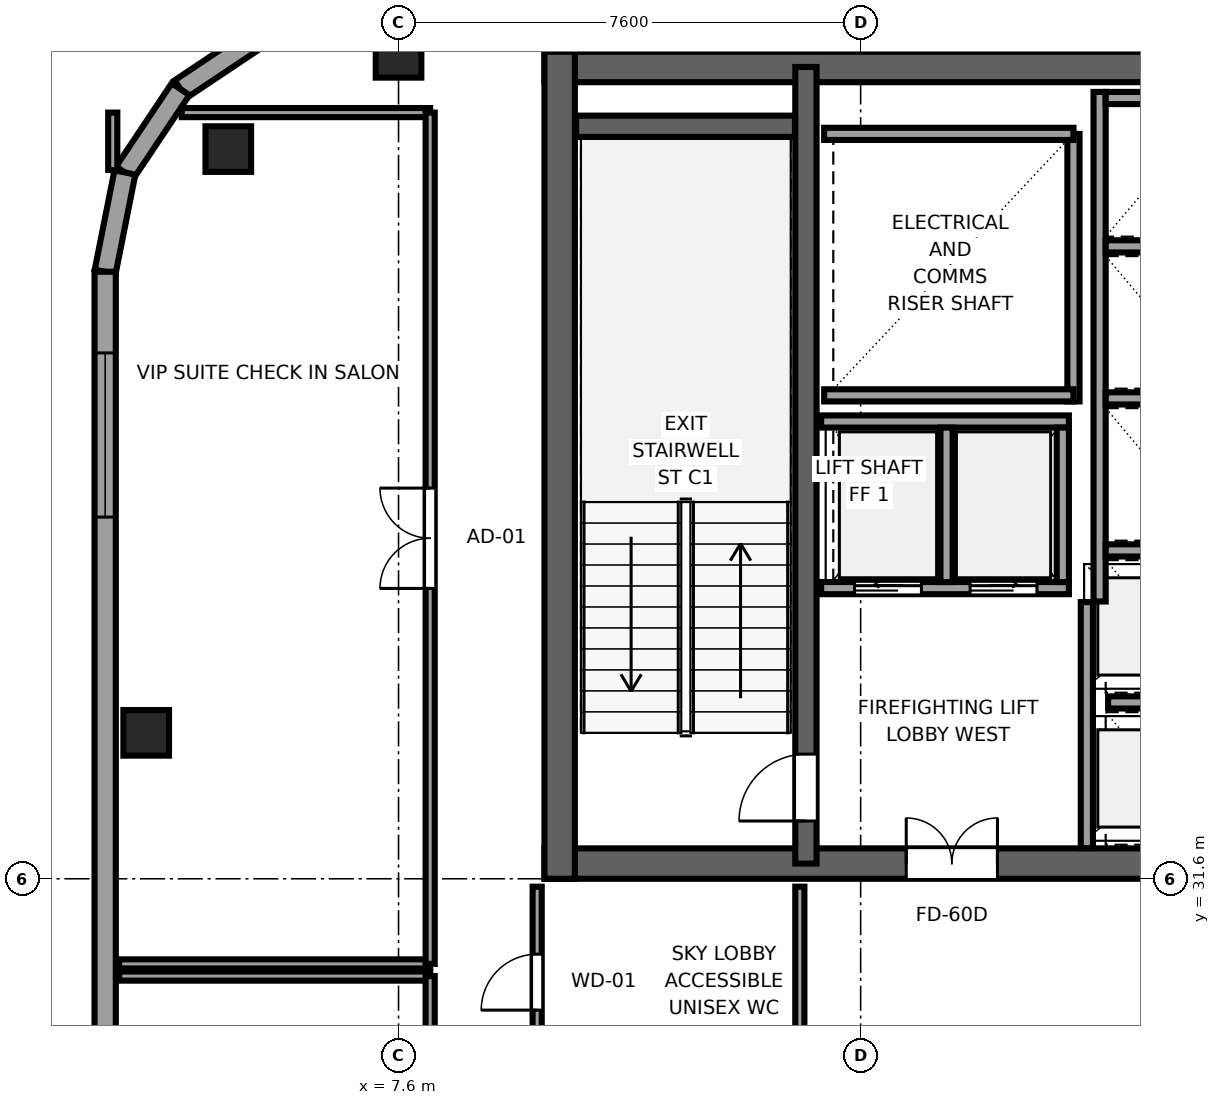
"""IFC4 building model, lengths in metres.
Left out: names, types, materials, properties, quantities, classifications, styles, units other than length and angle.
Written with IfcOpenShell. Run it as: python <this file> out.ifc"""

import sys

from ifc_helpers import new_model, si_unit, direction, frame, frame_2d, origin, origin_2d, place, context, subcontext, project, spatial, rectangle, extrude, source, transform, mapped, element, fill, save


model = new_model("IFC4")
c1 = context("Model", 3, precision=1e-05, world=origin(), true_north=direction((0.0, 1.0)))
c2 = subcontext(c1, "Body", "Model", "MODEL_VIEW")
j1 = project(units=[si_unit("LENGTHUNIT", "METRE"), si_unit("PLANEANGLEUNIT", "RADIAN")], contexts=[c1])
p1 = place(None, origin())
s1 = spatial("IfcSite", under=j1, at=p1, CompositionType="ELEMENT")
p2 = place(p1, origin())
s2 = spatial("IfcBuilding", under=s1, at=p2, CompositionType="ELEMENT")
p3 = place(p2, frame((0.0, 0.0, 205.3)))
s3 = spatial("IfcBuildingStorey", under=s2, at=p3, CompositionType="ELEMENT", Elevation=205.3)
p4 = place(p3, frame((10.0, 31.85, 0.0), z_axis=(0.0, 0.0, 1.0), x_axis=(1.0, 0.0, 0.0)))
e1 = element("IfcWall", 1, at=p4, inside=s3, PredefinedType="SHEAR", context=c2, shape_type="SweptSolid", body=[
    extrude(rectangle(XDim=26.0, YDim=0.5, at=frame_2d((13.0, 0.0))), origin(), (0.0, 0.0, 1.0), 4.4),
])
p5 = place(p4, frame((7.45, 0.0, 0.0), z_axis=(0.0, 0.0, 1.0), x_axis=(-1.0, 0.0, 0.0)))
e2 = element("IfcOpeningElement", 2, at=p5, cuts=e1, PredefinedType="OPENING", context=c2, shape_type="SweptSolid", body=[
    extrude(rectangle(XDim=1.5, YDim=2.04, at=frame_2d((0.75, 1.02))), frame((0.0, 0.26, 0.0), z_axis=(0.0, -1.0, 0.0), x_axis=(1.0, 0.0, 0.0)), (0.0, 0.0, 1.0), 0.52),
])
p6 = place(p4, frame((13.75, 0.0, 0.0), z_axis=(0.0, 0.0, 1.0), x_axis=(-1.0, 0.0, 0.0)))
e3 = element("IfcOpeningElement", 3, at=p6, cuts=e1, PredefinedType="OPENING", context=c2, shape_type="SweptSolid", body=[
    extrude(rectangle(XDim=1.5, YDim=2.04, at=frame_2d((0.75, 1.02))), frame((0.0, 0.26, 0.0), z_axis=(0.0, -1.0, 0.0), x_axis=(1.0, 0.0, 0.0)), (0.0, 0.0, 1.0), 0.52),
])
p7 = place(p4, frame((20.05, 0.0, 0.0), z_axis=(0.0, 0.0, 1.0), x_axis=(-1.0, 0.0, 0.0)))
e4 = element("IfcOpeningElement", 4, at=p7, cuts=e1, PredefinedType="OPENING", context=c2, shape_type="SweptSolid", body=[
    extrude(rectangle(XDim=1.5, YDim=2.04, at=frame_2d((0.75, 1.02))), frame((0.0, 0.26, 0.0), z_axis=(0.0, -1.0, 0.0), x_axis=(1.0, 0.0, 0.0)), (0.0, 0.0, 1.0), 0.52),
])
p8 = place(p3, frame((10.0, 44.95, 0.0), z_axis=(0.0, 0.0, 1.0), x_axis=(1.0, 0.0, 0.0)))
e5 = element("IfcWall", 5, at=p8, inside=s3, PredefinedType="SHEAR", context=c2, shape_type="SweptSolid", body=[
    extrude(rectangle(XDim=26.0, YDim=0.5, at=frame_2d((13.0, 0.0))), origin(), (0.0, 0.0, 1.0), 4.4),
])
p9 = place(p3, frame((10.25, 31.6, 0.0), z_axis=(0.0, 0.0, 1.0), x_axis=(0.0, 1.0, 0.0)))
e6 = element("IfcWall", 6, at=p9, inside=s3, PredefinedType="SHEAR", context=c2, shape_type="SweptSolid", body=[
    extrude(rectangle(XDim=13.6, YDim=0.5, at=frame_2d((6.8, 0.0))), origin(), (0.0, 0.0, 1.0), 4.4),
])
p10 = place(p3, frame((14.3, 31.85, 0.0), z_axis=(0.0, 0.0, 1.0), x_axis=(0.0, 1.0, 0.0)))
e7 = element("IfcWall", 7, at=p10, inside=s3, PredefinedType="SHEAR", context=c2, shape_type="SweptSolid", body=[
    extrude(rectangle(XDim=13.1, YDim=0.35, at=frame_2d((6.55, 0.0))), origin(), (0.0, 0.0, 1.0), 4.4),
])
p11 = place(p10, frame((0.7, 0.0, 0.0)))
e8 = element("IfcOpeningElement", 8, at=p11, cuts=e7, PredefinedType="OPENING", context=c2, shape_type="SweptSolid", body=[
    extrude(rectangle(XDim=1.1, YDim=2.12, at=frame_2d((0.55, 1.06))), frame((0.0, 0.185, 0.0), z_axis=(0.0, -1.0, 0.0), x_axis=(1.0, 0.0, 0.0)), (0.0, 0.0, 1.0), 0.37),
])
p12 = place(p3, frame((10.52, 43.975, 0.0), z_axis=(0.0, 0.0, 1.0), x_axis=(1.0, 0.0, 0.0)))
e9 = element("IfcWall", 9, at=p12, inside=s3, PredefinedType="SHEAR", context=c2, shape_type="SweptSolid", body=[
    extrude(rectangle(XDim=3.6, YDim=0.35, at=frame_2d((1.8, 0.0))), origin(), (0.0, 0.0, 1.0), 4.4),
])
m1 = source(origin(), c2, "Body", "SweptSolid", [
    extrude(rectangle(XDim=0.75, YDim=0.75, at=origin_2d()), origin(), (0.0, 0.0, 1.0), 4.4),
])
for number, where, z_axis, x_axis in (
    (10, (4.8, 43.6, 0.0), (0.0, 0.0, 1.0), (1.0, 0.0, 0.0)),
    (11, (7.6, 45.15, 0.0), (0.0, 0.0, 1.0), (1.0, 0.0, 0.0)),
    (12, (3.45, 34.0, 0.0), (0.0, 0.0, 1.0), (1.0, 0.0, 0.0)),
):
    element("IfcColumn", number, at=place(p3, frame(where, z_axis=z_axis, x_axis=x_axis)), inside=s3, PredefinedType="COLUMN", context=c2, shape_type="MappedRepresentation", body=[
        mapped(m1, transform((0.0, 0.0, 0.0), x_axis=(1.0, 0.0, 0.0), y_axis=(0.0, 1.0, 0.0), z_axis=(0.0, 0.0, 1.0), scale=1.0)),
    ])
for number, where, z_axis, x_axis in (
    (13, (5.385, 45.5, 0.0), (0.0, 0.0, 1.0), (-0.832, -0.556, 0.0)),
    (14, (4.015, 44.585, 0.0), (0.0, 0.0, 1.0), (-0.556, -0.831, 0.0)),
):
    element("IfcWall", number, at=place(p3, frame(where, z_axis=z_axis, x_axis=x_axis)), inside=s3, PredefinedType="SOLIDWALL", context=c2, shape_type="SweptSolid", body=[
        extrude(rectangle(XDim=1.647, YDim=0.35, at=frame_2d((0.824, 0.0))), origin(), (0.0, 0.0, 1.0), 3.75),
    ])
p13 = place(p3, frame((3.1, 43.216, 0.0), z_axis=(0.0, 0.0, 1.0), x_axis=(-0.195044345786, -0.980794424524, 0.0)))
e15 = element("IfcWall", 15, at=p13, inside=s3, PredefinedType="SOLIDWALL", context=c2, shape_type="SweptSolid", body=[
    extrude(rectangle(XDim=1.665, YDim=0.35, at=frame_2d((0.833, 0.0))), origin(), (0.0, 0.0, 1.0), 4.22),
])
p14 = place(p3, frame((2.775, 41.583, 0.0), z_axis=(0.0, 0.0, 1.0), x_axis=(0.0, -1.0, 0.0)))
e16 = element("IfcWall", 16, at=p14, inside=s3, PredefinedType="SOLIDWALL", context=c2, shape_type="SweptSolid", body=[
    extrude(rectangle(XDim=34.566, YDim=0.35, at=frame_2d((17.283, 0.0))), origin(), (0.0, 0.0, 1.0), 4.22),
])
p15 = place(p14, frame((1.335, 0.0, 0.68)))
e17 = element("IfcOpeningElement", 17, at=p15, cuts=e16, PredefinedType="OPENING", context=c2, shape_type="SweptSolid", body=[
    extrude(rectangle(XDim=2.7, YDim=1.95, at=frame_2d((1.35, 0.975))), frame((0.0, 0.185, 0.0), z_axis=(0.0, -1.0, 0.0), x_axis=(1.0, 0.0, 0.0)), (0.0, 0.0, 1.0), 0.37),
])
p16 = place(p14, frame((13.297, 0.0, 0.68)))
e18 = element("IfcOpeningElement", 18, at=p16, cuts=e16, PredefinedType="OPENING", context=c2, shape_type="SweptSolid", body=[
    extrude(rectangle(XDim=2.7, YDim=1.95, at=frame_2d((1.35, 0.975))), frame((0.0, 0.185, 0.0), z_axis=(0.0, -1.0, 0.0), x_axis=(1.0, 0.0, 0.0)), (0.0, 0.0, 1.0), 0.37),
])
p17 = place(p14, frame((22.189, 0.0, 0.68)))
e19 = element("IfcOpeningElement", 19, at=p17, cuts=e16, PredefinedType="OPENING", context=c2, shape_type="SweptSolid", body=[
    extrude(rectangle(XDim=2.7, YDim=1.95, at=frame_2d((1.35, 0.975))), frame((0.0, 0.185, 0.0), z_axis=(0.0, -1.0, 0.0), x_axis=(1.0, 0.0, 0.0)), (0.0, 0.0, 1.0), 0.37),
])
p18 = place(p14, frame((26.36, 0.0, 0.68)))
e20 = element("IfcOpeningElement", 20, at=p18, cuts=e16, PredefinedType="OPENING", context=c2, shape_type="SweptSolid", body=[
    extrude(rectangle(XDim=2.7, YDim=1.95, at=frame_2d((1.35, 0.975))), frame((0.0, 0.185, 0.0), z_axis=(0.0, -1.0, 0.0), x_axis=(1.0, 0.0, 0.0)), (0.0, 0.0, 1.0), 0.37),
])
p19 = place(p14, frame((29.98, 0.0, 0.68)))
e21 = element("IfcOpeningElement", 21, at=p19, cuts=e16, PredefinedType="OPENING", context=c2, shape_type="SweptSolid", body=[
    extrude(rectangle(XDim=2.7, YDim=1.95, at=frame_2d((1.35, 0.975))), frame((0.0, 0.185, 0.0), z_axis=(0.0, -1.0, 0.0), x_axis=(1.0, 0.0, 0.0)), (0.0, 0.0, 1.0), 0.37),
])
p20 = place(p3, frame((18.7, 39.45, 0.0), z_axis=(0.0, 0.0, 1.0), x_axis=(0.0, 1.0, 0.0)))
e22 = element("IfcWall", 22, at=p20, inside=s3, PredefinedType="SOLIDWALL", context=c2, shape_type="SweptSolid", body=[
    extrude(rectangle(XDim=4.4, YDim=0.2, at=frame_2d((2.2, 0.0))), origin(), (0.0, 0.0, 1.0), 4.22),
])
for number, where, z_axis, x_axis in (
    (23, (14.6, 39.55, 0.0), (0.0, 0.0, 1.0), (1.0, 0.0, 0.0)),
    (24, (14.6, 43.85, 0.0), (0.0, 0.0, 1.0), (1.0, 0.0, 0.0)),
):
    element("IfcWall", number, at=place(p3, frame(where, z_axis=z_axis, x_axis=x_axis)), inside=s3, PredefinedType="SOLIDWALL", context=c2, shape_type="SweptSolid", body=[
        extrude(rectangle(XDim=4.1, YDim=0.2, at=frame_2d((2.05, 0.0))), origin(), (0.0, 0.0, 1.0), 4.22),
    ])
p21 = place(p3, frame((18.92, 32.104, 0.0), z_axis=(0.0, 0.0, 1.0), x_axis=(0.0, 1.0, 0.0)))
e25 = element("IfcWall", 25, at=p21, inside=s3, PredefinedType="SOLIDWALL", context=c2, shape_type="SweptSolid", body=[
    extrude(rectangle(XDim=4.046, YDim=0.2, at=frame_2d((2.023, 0.0))), origin(), (0.0, 0.0, 1.0), 4.22),
])
p22 = place(p3, frame((19.13, 36.16, 0.0), z_axis=(0.0, 0.0, 1.0), x_axis=(0.0, 1.0, 0.0)))
e26 = element("IfcWall", 26, at=p22, inside=s3, PredefinedType="SOLIDWALL", context=c2, shape_type="SweptSolid", body=[
    extrude(rectangle(XDim=8.38, YDim=0.2, at=frame_2d((4.19, 0.0))), origin(), (0.0, 0.0, 1.0), 4.22),
])
p23 = place(p3, frame((19.23, 44.44, 0.0), z_axis=(0.0, 0.0, 1.0), x_axis=(1.0, 0.0, 0.0)))
e27 = element("IfcWall", 27, at=p23, inside=s3, PredefinedType="SOLIDWALL", context=c2, shape_type="SweptSolid", body=[
    extrude(rectangle(XDim=1.84, YDim=0.2, at=frame_2d((0.92, 0.0))), origin(), (0.0, 0.0, 1.0), 4.22),
])
p24 = place(p3, frame((19.27, 34.5, 0.0), z_axis=(0.0, 0.0, 1.0), x_axis=(1.0, 0.0, 0.0)))
e28 = element("IfcWall", 28, at=p24, inside=s3, PredefinedType="SOLIDWALL", context=c2, shape_type="SweptSolid", body=[
    extrude(rectangle(XDim=1.8, YDim=0.2, at=frame_2d((0.9, 0.0))), origin(), (0.0, 0.0, 1.0), 4.22),
])
for number, where, z_axis, x_axis in (
    (29, (19.23, 37.0, 0.0), (0.0, 0.0, 1.0), (1.0, 0.0, 0.0)),
    (30, (19.23, 39.5, 0.0), (0.0, 0.0, 1.0), (1.0, 0.0, 0.0)),
    (31, (19.23, 42.0, 0.0), (0.0, 0.0, 1.0), (1.0, 0.0, 0.0)),
):
    element("IfcWall", number, at=place(p3, frame(where, z_axis=z_axis, x_axis=x_axis)), inside=s3, PredefinedType="SOLIDWALL", context=c2, shape_type="SweptSolid", body=[
        extrude(rectangle(XDim=1.84, YDim=0.2, at=frame_2d((0.92, 0.0))), origin(), (0.0, 0.0, 1.0), 4.22),
    ])
p25 = place(p3, frame((14.55, 36.38, 0.0), z_axis=(0.0, 0.0, 1.0), x_axis=(1.0, 0.0, 0.0)))
e32 = element("IfcWall", 32, at=p25, inside=s3, PredefinedType="SOLIDWALL", context=c2, shape_type="SweptSolid", body=[
    extrude(rectangle(XDim=4.075, YDim=0.2, at=frame_2d((2.038, 0.0))), origin(), (0.0, 0.0, 1.0), 4.22),
])
p26 = place(p25, frame((0.55, 0.0, 0.0)))
e33 = element("IfcOpeningElement", 33, at=p26, cuts=e32, PredefinedType="OPENING", context=c2, shape_type="SweptSolid", body=[
    extrude(rectangle(XDim=1.1, YDim=2.12, at=frame_2d((0.55, 1.06))), frame((0.0, 0.11, 0.0), z_axis=(0.0, -1.0, 0.0), x_axis=(1.0, 0.0, 0.0)), (0.0, 0.0, 1.0), 0.22),
])
p27 = place(p25, frame((2.45, 0.0, 0.0)))
e34 = element("IfcOpeningElement", 34, at=p27, cuts=e32, PredefinedType="OPENING", context=c2, shape_type="SweptSolid", body=[
    extrude(rectangle(XDim=1.1, YDim=2.12, at=frame_2d((0.55, 1.06))), frame((0.0, 0.11, 0.0), z_axis=(0.0, -1.0, 0.0), x_axis=(1.0, 0.0, 0.0)), (0.0, 0.0, 1.0), 0.22),
])
p28 = place(p3, frame((14.55, 39.12, 0.0), z_axis=(0.0, 0.0, 1.0), x_axis=(1.0, 0.0, 0.0)))
e35 = element("IfcWall", 35, at=p28, inside=s3, PredefinedType="SOLIDWALL", context=c2, shape_type="SweptSolid", body=[
    extrude(rectangle(XDim=4.075, YDim=0.2, at=frame_2d((2.038, 0.0))), origin(), (0.0, 0.0, 1.0), 4.22),
])
for number, where, z_axis, x_axis in (
    (36, (18.525, 36.48, 0.0), (0.0, 0.0, 1.0), (0.0, 1.0, 0.0)),
    (37, (16.613, 36.48, 0.0), (0.0, 0.0, 1.0), (0.0, 1.0, 0.0)),
):
    element("IfcWall", number, at=place(p3, frame(where, z_axis=z_axis, x_axis=x_axis)), inside=s3, PredefinedType="SOLIDWALL", context=c2, shape_type="SweptSolid", body=[
        extrude(rectangle(XDim=2.54, YDim=0.2, at=frame_2d((1.27, 0.0))), origin(), (0.0, 0.0, 1.0), 4.22),
    ])
p29 = place(p3, frame((3.005, 30.2, 0.0), z_axis=(0.0, 0.0, 1.0), x_axis=(1.0, 0.0, 0.0)))
e38 = element("IfcWall", 38, at=p29, inside=s3, PredefinedType="PARTITIONING", context=c2, shape_type="SweptSolid", body=[
    extrude(rectangle(XDim=5.115, YDim=0.15, at=frame_2d((2.558, 0.0))), origin(), (0.0, 0.0, 1.0), 4.22),
])
p30 = place(p3, frame((4.034, 44.2, 0.0), z_axis=(0.0, 0.0, 1.0), x_axis=(1.0, 0.0, 0.0)))
e39 = element("IfcWall", 39, at=p30, inside=s3, PredefinedType="PARTITIONING", context=c2, shape_type="SweptSolid", body=[
    extrude(rectangle(XDim=4.086, YDim=0.15, at=frame_2d((2.043, 0.0))), origin(), (0.0, 0.0, 1.0), 3.75),
])
p31 = place(p3, frame((2.9, 43.255, 0.0), z_axis=(0.0, 0.0, 1.0), x_axis=(0.0, 1.0, 0.0)))
e40 = element("IfcWall", 40, at=p31, inside=s3, PredefinedType="PARTITIONING", context=c2, shape_type="SweptSolid", body=[
    extrude(rectangle(XDim=0.945, YDim=0.15, at=frame_2d((0.473, 0.0))), origin(), (0.0, 0.0, 1.0), 4.22),
])
p32 = place(p3, frame((8.12, 30.2, 0.0), z_axis=(0.0, 0.0, 1.0), x_axis=(0.0, 1.0, 0.0)))
e41 = element("IfcWall", 41, at=p32, inside=s3, PredefinedType="PARTITIONING", context=c2, shape_type="SweptSolid", body=[
    extrude(rectangle(XDim=14.0, YDim=0.15, at=frame_2d((7.0, 0.0))), origin(), (0.0, 0.0, 1.0), 4.22),
])
p33 = place(p32, frame((6.175, 0.0, 0.0)))
e42 = element("IfcOpeningElement", 42, at=p33, cuts=e41, PredefinedType="OPENING", context=c2, shape_type="SweptSolid", body=[
    extrude(rectangle(XDim=1.65, YDim=2.15, at=frame_2d((0.825, 1.075))), frame((0.0, 0.085, 0.0), z_axis=(0.0, -1.0, 0.0), x_axis=(1.0, 0.0, 0.0)), (0.0, 0.0, 1.0), 0.17),
])
p34 = place(p3, frame((9.88, 28.33, 0.0), z_axis=(0.0, 0.0, 1.0), x_axis=(0.0, 1.0, 0.0)))
e43 = element("IfcWall", 43, at=p34, inside=s3, PredefinedType="PARTITIONING", context=c2, shape_type="SweptSolid", body=[
    extrude(rectangle(XDim=3.14, YDim=0.15, at=frame_2d((1.57, 0.0))), origin(), (0.0, 0.0, 1.0), 4.22),
])
p35 = place(p34, frame((1.11, 0.0, 0.0)))
e44 = element("IfcOpeningElement", 44, at=p35, cuts=e43, PredefinedType="OPENING", context=c2, shape_type="SweptSolid", body=[
    extrude(rectangle(XDim=0.92, YDim=2.01, at=frame_2d((0.46, 1.005))), frame((0.0, 0.085, 0.0), z_axis=(0.0, -1.0, 0.0), x_axis=(1.0, 0.0, 0.0)), (0.0, 0.0, 1.0), 0.17),
])
p36 = place(p3, frame((14.2, 28.33, 0.0), z_axis=(0.0, 0.0, 1.0), x_axis=(0.0, 1.0, 0.0)))
e45 = element("IfcWall", 45, at=p36, inside=s3, PredefinedType="PARTITIONING", context=c2, shape_type="SweptSolid", body=[
    extrude(rectangle(XDim=3.14, YDim=0.15, at=frame_2d((1.57, 0.0))), origin(), (0.0, 0.0, 1.0), 4.22),
])
p37 = place(p3, frame((3.005, 30.0, 0.0), z_axis=(0.0, 0.0, 1.0), x_axis=(1.0, 0.0, 0.0)))
e46 = element("IfcWall", 46, at=p37, inside=s3, PredefinedType="PARTITIONING", context=c2, shape_type="SweptSolid", body=[
    extrude(rectangle(XDim=5.115, YDim=0.15, at=frame_2d((2.558, 0.0))), origin(), (0.0, 0.0, 1.0), 4.22),
])
p38 = place(p3, frame((8.12, 24.8, 0.0), z_axis=(0.0, 0.0, 1.0), x_axis=(0.0, 1.0, 0.0)))
e47 = element("IfcWall", 47, at=p38, inside=s3, PredefinedType="PARTITIONING", context=c2, shape_type="SweptSolid", body=[
    extrude(rectangle(XDim=5.2, YDim=0.15, at=frame_2d((2.6, 0.0))), origin(), (0.0, 0.0, 1.0), 4.22),
])
p39 = place(p38, frame((2.09, 0.0, 0.0)))
e48 = element("IfcOpeningElement", 48, at=p39, cuts=e47, PredefinedType="OPENING", context=c2, shape_type="SweptSolid", body=[
    extrude(rectangle(XDim=1.02, YDim=2.03, at=frame_2d((0.51, 1.015))), frame((0.0, 0.085, 0.0), z_axis=(0.0, -1.0, 0.0), x_axis=(1.0, 0.0, 0.0)), (0.0, 0.0, 1.0), 0.17),
])
m2 = source(origin(), c2, "Body", "SweptSolid", [
    extrude(rectangle(XDim=2.7, YDim=1.95, at=frame_2d((1.35, 0.975))), frame((0.0, 0.09, 0.0), z_axis=(0.0, -1.0, 0.0), x_axis=(1.0, 0.0, 0.0)), (0.0, 0.0, 1.0), 0.06),
])
p40 = place(p15, origin())
e49 = element("IfcWindow", 49, at=p40, inside=s3, PartitioningType="TRIPLE_PANEL_HORIZONTAL", PredefinedType="WINDOW", context=c2, shape_type="MappedRepresentation", body=[
    mapped(m2, transform((0.0, 0.0, 0.0), x_axis=(1.0, 0.0, 0.0), y_axis=(0.0, 1.0, 0.0), z_axis=(0.0, 0.0, 1.0), scale=1.0)),
])
fill(e17, e49)
m3 = source(origin(), c2, "Body", "SweptSolid", [
    extrude(rectangle(XDim=1.1, YDim=2.12, at=frame_2d((0.55, 1.06))), frame((0.0, 0.025, 0.0), z_axis=(0.0, -1.0, 0.0), x_axis=(1.0, 0.0, 0.0)), (0.0, 0.0, 1.0), 0.05),
])
p41 = place(p11, origin())
e50 = element("IfcDoor", 50, at=p41, inside=s3, OperationType="SINGLE_SWING_LEFT", PredefinedType="DOOR", context=c2, shape_type="MappedRepresentation", body=[
    mapped(m3, transform((0.0, 0.0, 0.0), x_axis=(1.0, 0.0, 0.0), y_axis=(0.0, 1.0, 0.0), z_axis=(0.0, 0.0, 1.0), scale=1.0)),
])
fill(e8, e50)
m4 = source(origin(), c2, "Body", "SweptSolid", [
    extrude(rectangle(XDim=1.5, YDim=2.04, at=frame_2d((0.75, 1.02))), frame((0.0, 0.025, 0.0), z_axis=(0.0, -1.0, 0.0), x_axis=(1.0, 0.0, 0.0)), (0.0, 0.0, 1.0), 0.05),
])
p42 = place(p5, origin())
e51 = element("IfcDoor", 51, at=p42, inside=s3, OperationType="DOUBLE_DOOR_SINGLE_SWING", PredefinedType="DOOR", context=c2, shape_type="MappedRepresentation", body=[
    mapped(m4, transform((0.0, 0.0, 0.0), x_axis=(1.0, 0.0, 0.0), y_axis=(0.0, 1.0, 0.0), z_axis=(0.0, 0.0, 1.0), scale=1.0)),
])
fill(e2, e51)
m5 = source(origin(), c2, "Body", "SweptSolid", [
    extrude(rectangle(XDim=1.1, YDim=2.12, at=frame_2d((0.55, 1.06))), frame((0.0, 0.025, 0.0), z_axis=(0.0, -1.0, 0.0), x_axis=(1.0, 0.0, 0.0)), (0.0, 0.0, 1.0), 0.05),
])
p43 = place(p26, origin())
e52 = element("IfcDoor", 52, at=p43, inside=s3, OperationType="SLIDING_TO_LEFT", PredefinedType="DOOR", context=c2, shape_type="MappedRepresentation", body=[
    mapped(m5, transform((0.0, 0.0, 0.0), x_axis=(1.0, 0.0, 0.0), y_axis=(0.0, 1.0, 0.0), z_axis=(0.0, 0.0, 1.0), scale=1.0)),
])
fill(e33, e52)
p44 = place(p27, origin())
e53 = element("IfcDoor", 53, at=p44, inside=s3, OperationType="SLIDING_TO_RIGHT", PredefinedType="DOOR", context=c2, shape_type="MappedRepresentation", body=[
    mapped(m5, transform((0.0, 0.0, 0.0), x_axis=(1.0, 0.0, 0.0), y_axis=(0.0, 1.0, 0.0), z_axis=(0.0, 0.0, 1.0), scale=1.0)),
])
fill(e34, e53)
m6 = source(origin(), c2, "Body", "SweptSolid", [
    extrude(rectangle(XDim=1.65, YDim=2.15, at=frame_2d((0.825, 1.075))), frame((0.0, 0.025, 0.0), z_axis=(0.0, -1.0, 0.0), x_axis=(1.0, 0.0, 0.0)), (0.0, 0.0, 1.0), 0.05),
])
p45 = place(p33, origin())
e54 = element("IfcDoor", 54, at=p45, inside=s3, OperationType="DOUBLE_DOOR_SINGLE_SWING", PredefinedType="DOOR", context=c2, shape_type="MappedRepresentation", body=[
    mapped(m6, transform((0.0, 0.0, 0.0), x_axis=(1.0, 0.0, 0.0), y_axis=(0.0, 1.0, 0.0), z_axis=(0.0, 0.0, 1.0), scale=1.0)),
])
fill(e42, e54)
m7 = source(origin(), c2, "Body", "SweptSolid", [
    extrude(rectangle(XDim=0.92, YDim=2.01, at=frame_2d((0.46, 1.005))), frame((0.0, 0.025, 0.0), z_axis=(0.0, -1.0, 0.0), x_axis=(1.0, 0.0, 0.0)), (0.0, 0.0, 1.0), 0.05),
])
p46 = place(p35, origin())
e55 = element("IfcDoor", 55, at=p46, inside=s3, OperationType="SINGLE_SWING_LEFT", PredefinedType="DOOR", context=c2, shape_type="MappedRepresentation", body=[
    mapped(m7, transform((0.0, 0.0, 0.0), x_axis=(1.0, 0.0, 0.0), y_axis=(0.0, 1.0, 0.0), z_axis=(0.0, 0.0, 1.0), scale=1.0)),
])
fill(e44, e55)
save(model, sys.argv[1])
